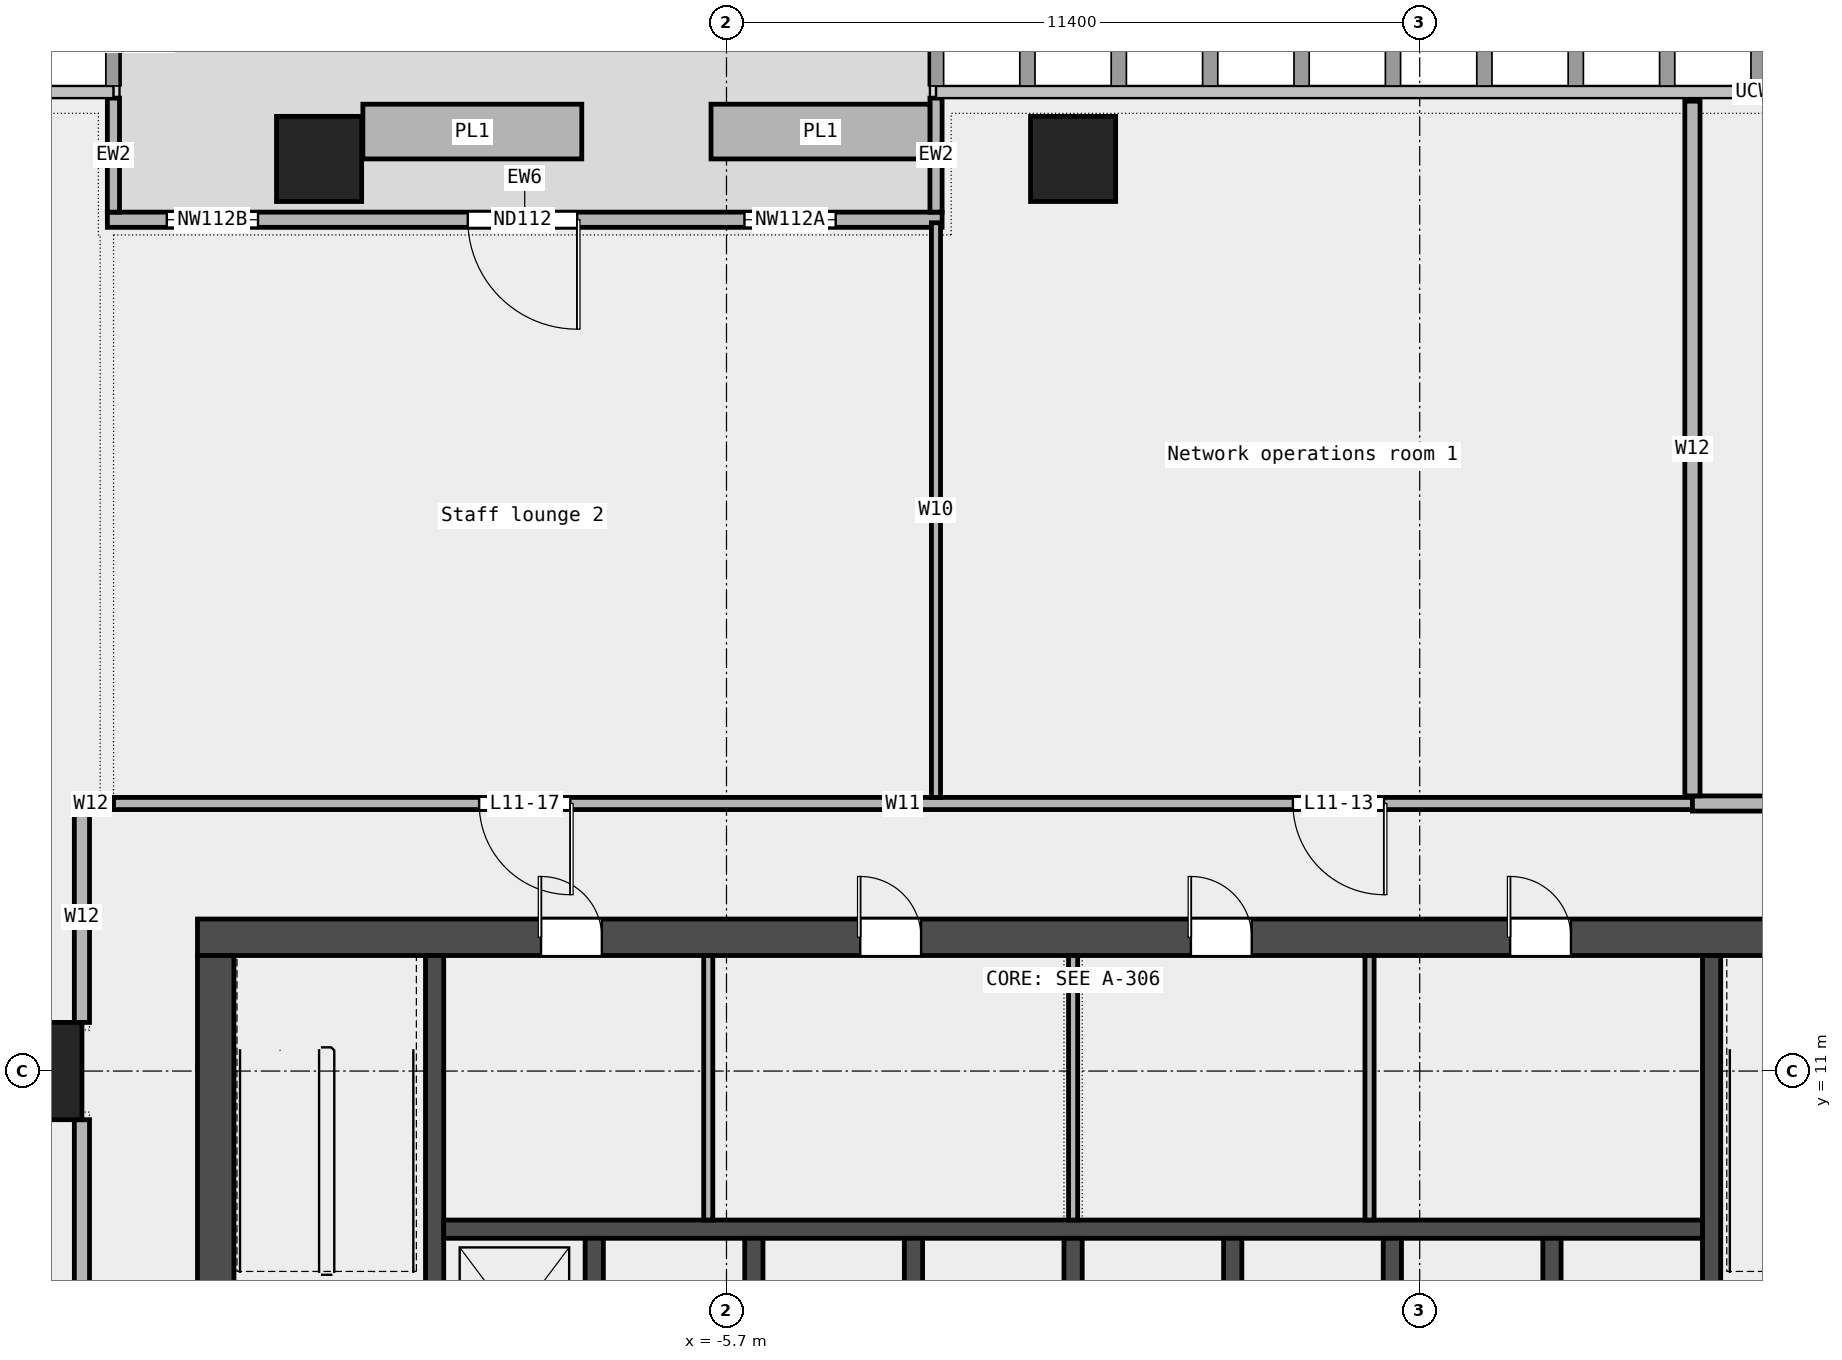
"""IFC4 building model, lengths in metres.
Left out: names, types, materials, properties, quantities, classifications, styles, units other than length and angle.
Written with IfcOpenShell. Run it as: python <this file> out.ifc"""

import sys

from ifc_helpers import new_model, si_unit, direction, frame, frame_2d, origin, origin_2d, place, context, subcontext, project, spatial, rectangle, extrude, element, fill, save


model = new_model("IFC4")
c1 = context("Model", 3, precision=1e-05, world=origin(), true_north=direction((0.0, 1.0)))
c2 = subcontext(c1, "Body", "Model", "MODEL_VIEW")
j1 = project(units=[si_unit("LENGTHUNIT", "METRE"), si_unit("PLANEANGLEUNIT", "RADIAN")], contexts=[c1])
p1 = place(None, origin())
s1 = spatial("IfcSite", under=j1, at=p1, CompositionType="ELEMENT")
p2 = place(p1, origin())
s2 = spatial("IfcBuilding", under=s1, at=p2, CompositionType="ELEMENT")
p3 = place(p2, frame((0.0, 0.0, 59.8)))
s3 = spatial("IfcBuildingStorey", under=s2, at=p3, CompositionType="ELEMENT", Elevation=59.8)
for number, where, z_axis, x_axis in (
    (1, (0.0, 26.0, 0.0), (0.0, 0.0, 1.0), (1.0, 0.0, 0.0)),
    (2, (-12.4, 26.0, 0.0), (0.0, 0.0, 1.0), (1.0, 0.0, 0.0)),
):
    element("IfcColumn", number, at=place(p3, frame(where, z_axis=z_axis, x_axis=x_axis)), inside=s3, PredefinedType="COLUMN", context=c2, shape_type="SweptSolid", body=[
        extrude(rectangle(XDim=1.4, YDim=1.4, at=origin_2d()), origin(), (0.0, 0.0, 1.0), 4.35),
    ])
p4 = place(p3, frame((-17.1, 11.0, 0.0), z_axis=(0.0, 0.0, 1.0), x_axis=(1.0, 0.0, 0.0)))
e3 = element("IfcColumn", 3, at=p4, inside=s3, PredefinedType="COLUMN", context=c2, shape_type="SweptSolid", body=[
    extrude(rectangle(XDim=1.6, YDim=1.6, at=origin_2d()), origin(), (0.0, 0.0, 1.0), 4.35),
])
p5 = place(p3, frame((-2.155, 25.0, 0.0), z_axis=(0.0, 0.0, 1.0), x_axis=(-1.0, 0.0, 0.0)))
e4 = element("IfcWall", 4, at=p5, inside=s3, PredefinedType="STANDARD", context=c2, shape_type="SweptSolid", body=[
    extrude(rectangle(XDim=13.727, YDim=0.25, at=frame_2d((6.864, 0.0))), origin(), (0.0, 0.0, 1.0), 4.35),
])
p6 = place(p5, frame((1.75, 0.0, 0.45)))
e5 = element("IfcOpeningElement", 5, at=p6, cuts=e4, PredefinedType="OPENING", context=c2, shape_type="SweptSolid", body=[
    extrude(rectangle(XDim=1.5, YDim=3.0, at=frame_2d((0.75, 1.5))), frame((0.0, 0.137, 0.0), z_axis=(0.0, -1.0, 0.0), x_axis=(1.0, 0.0, 0.0)), (0.0, 0.0, 1.0), 0.274),
])
p7 = place(p5, frame((6.0, 0.0, 0.0)))
e6 = element("IfcOpeningElement", 6, at=p7, cuts=e4, PredefinedType="OPENING", context=c2, shape_type="SweptSolid", body=[
    extrude(rectangle(XDim=1.8, YDim=2.4, at=frame_2d((0.9, 1.2))), frame((0.0, 0.137, 0.0), z_axis=(0.0, -1.0, 0.0), x_axis=(1.0, 0.0, 0.0)), (0.0, 0.0, 1.0), 0.274),
])
p8 = place(p5, frame((11.25, 0.0, 0.45)))
e7 = element("IfcOpeningElement", 7, at=p8, cuts=e4, PredefinedType="OPENING", context=c2, shape_type="SweptSolid", body=[
    extrude(rectangle(XDim=1.5, YDim=3.0, at=frame_2d((0.75, 1.5))), frame((0.0, 0.137, 0.0), z_axis=(0.0, -1.0, 0.0), x_axis=(1.0, 0.0, 0.0)), (0.0, 0.0, 1.0), 0.274),
])
for number, where, z_axis, x_axis in (
    (8, (-2.255, 27.0, 0.0), (0.0, 0.0, 1.0), (0.0, -1.0, 0.0)),
    (9, (-15.782, 27.0, 0.0), (0.0, 0.0, 1.0), (0.0, -1.0, 0.0)),
):
    element("IfcWall", number, at=place(p3, frame(where, z_axis=z_axis, x_axis=x_axis)), inside=s3, PredefinedType="STANDARD", context=c2, shape_type="SweptSolid", body=[
        extrude(rectangle(XDim=1.875, YDim=0.2, at=frame_2d((0.938, 0.0))), origin(), (0.0, 0.0, 1.0), 4.35),
    ])
for number, where, z_axis, x_axis in (
    (10, (-2.354, 26.45, 0.0), (0.0, 0.0, 1.0), (-1.0, 0.0, 0.0)),
    (11, (-8.08, 26.45, 0.0), (0.0, 0.0, 1.0), (-1.0, 0.0, 0.0)),
):
    element("IfcWall", number, at=place(p3, frame(where, z_axis=z_axis, x_axis=x_axis)), inside=s3, PredefinedType="STANDARD", context=c2, shape_type="SweptSolid", body=[
        extrude(rectangle(XDim=3.6, YDim=0.9, at=frame_2d((1.8, 0.0))), origin(), (0.0, 0.0, 1.0), 0.7),
    ])
p9 = place(p3, frame((-15.78, 15.4, 0.0), z_axis=(0.0, 0.0, 1.0), x_axis=(1.0, 0.0, 0.0)))
e12 = element("IfcWall", 12, at=p9, inside=s3, PredefinedType="PARTITIONING", context=c2, shape_type="SweptSolid", body=[
    extrude(rectangle(XDim=25.965, YDim=0.2, at=frame_2d((12.982, 0.0))), origin(), (0.0, 0.0, 1.0), 4.35),
])
p10 = place(p9, frame((19.395, 0.0, 0.0)))
e13 = element("IfcOpeningElement", 13, at=p10, cuts=e12, PredefinedType="OPENING", context=c2, shape_type="SweptSolid", body=[
    extrude(rectangle(XDim=1.5, YDim=2.1, at=frame_2d((0.75, 1.05))), frame((0.0, 0.112, 0.0), z_axis=(0.0, -1.0, 0.0), x_axis=(1.0, 0.0, 0.0)), (0.0, 0.0, 1.0), 0.224),
])
p11 = place(p9, frame((6.012, 0.0, 0.0)))
e14 = element("IfcOpeningElement", 14, at=p11, cuts=e12, PredefinedType="OPENING", context=c2, shape_type="SweptSolid", body=[
    extrude(rectangle(XDim=1.5, YDim=2.1, at=frame_2d((0.75, 1.05))), frame((0.0, 0.112, 0.0), z_axis=(0.0, -1.0, 0.0), x_axis=(1.0, 0.0, 0.0)), (0.0, 0.0, 1.0), 0.224),
])
p12 = place(p3, frame((-16.3, 15.4, 0.0), z_axis=(0.0, 0.0, 1.0), x_axis=(1.0, 0.0, 0.0)))
e15 = element("IfcWall", 15, at=p12, inside=s3, PredefinedType="PARTITIONING", context=c2, shape_type="SweptSolid", body=[
    extrude(rectangle(XDim=0.3, YDim=0.25, at=frame_2d((0.15, 0.0))), origin(), (0.0, 0.0, 1.0), 4.35),
])
p13 = place(p3, frame((10.185, 15.4, 0.0), z_axis=(0.0, 0.0, 1.0), x_axis=(1.0, 0.0, 0.0)))
e16 = element("IfcWall", 16, at=p13, inside=s3, PredefinedType="PARTITIONING", context=c2, shape_type="SweptSolid", body=[
    extrude(rectangle(XDim=11.515, YDim=0.25, at=frame_2d((5.757, 0.0))), origin(), (0.0, 0.0, 1.0), 4.35),
])
p14 = place(p13, frame((2.157, 0.0, 0.0)))
e17 = element("IfcOpeningElement", 17, at=p14, cuts=e16, PredefinedType="OPENING", context=c2, shape_type="SweptSolid", body=[
    extrude(rectangle(XDim=1.8, YDim=2.1, at=frame_2d((0.9, 1.05))), frame((0.0, 0.137, 0.0), z_axis=(0.0, -1.0, 0.0), x_axis=(1.0, 0.0, 0.0)), (0.0, 0.0, 1.0), 0.274),
])
p15 = place(p3, frame((-16.3, 0.8, 0.0), z_axis=(0.0, 0.0, 1.0), x_axis=(0.0, 1.0, 0.0)))
e18 = element("IfcWall", 18, at=p15, inside=s3, PredefinedType="PARTITIONING", context=c2, shape_type="SweptSolid", body=[
    extrude(rectangle(XDim=9.4, YDim=0.25, at=frame_2d((4.7, 0.0))), origin(), (0.0, 0.0, 1.0), 4.35),
])
p16 = place(p15, frame((3.8, 0.0, 0.0)))
e19 = element("IfcOpeningElement", 19, at=p16, cuts=e18, PredefinedType="OPENING", context=c2, shape_type="SweptSolid", body=[
    extrude(rectangle(XDim=1.8, YDim=2.1, at=frame_2d((0.9, 1.05))), frame((0.0, 0.137, 0.0), z_axis=(0.0, -1.0, 0.0), x_axis=(1.0, 0.0, 0.0)), (0.0, 0.0, 1.0), 0.274),
])
p17 = place(p3, frame((-16.3, 11.8, 0.0), z_axis=(0.0, 0.0, 1.0), x_axis=(0.0, 1.0, 0.0)))
e20 = element("IfcWall", 20, at=p17, inside=s3, PredefinedType="PARTITIONING", context=c2, shape_type="SweptSolid", body=[
    extrude(rectangle(XDim=3.475, YDim=0.25, at=frame_2d((1.737, 0.0))), origin(), (0.0, 0.0, 1.0), 4.35),
])
p18 = place(p3, frame((-2.255, 15.5, 0.0), z_axis=(0.0, 0.0, 1.0), x_axis=(0.0, 1.0, 0.0)))
e21 = element("IfcWall", 21, at=p18, inside=s3, PredefinedType="PARTITIONING", context=c2, shape_type="SweptSolid", body=[
    extrude(rectangle(XDim=9.45, YDim=0.15, at=frame_2d((4.725, 0.0))), origin(), (0.0, 0.0, 1.0), 4.35),
])
p19 = place(p3, frame((10.185, 15.525, 0.0), z_axis=(0.0, 0.0, 1.0), x_axis=(0.0, 1.0, 0.0)))
e22 = element("IfcWall", 22, at=p19, inside=s3, PredefinedType="PARTITIONING", context=c2, shape_type="SweptSolid", body=[
    extrude(rectangle(XDim=11.425, YDim=0.25, at=frame_2d((5.712, 0.0))), origin(), (0.0, 0.0, 1.0), 4.35),
])
p20 = place(p3, frame((-14.4, 13.2, 0.0), z_axis=(0.0, 0.0, 1.0), x_axis=(1.0, 0.0, 0.0)))
e23 = element("IfcWall", 23, at=p20, inside=s3, PredefinedType="SHEAR", context=c2, shape_type="SweptSolid", body=[
    extrude(rectangle(XDim=28.8, YDim=0.6, at=frame_2d((14.4, 0.0))), origin(), (0.0, 0.0, 1.0), 4.5),
])
p21 = place(p20, frame((5.65, 0.0, 0.0)))
e24 = element("IfcOpeningElement", 24, at=p21, cuts=e23, PredefinedType="OPENING", context=c2, shape_type="SweptSolid", body=[
    extrude(rectangle(XDim=1.0, YDim=2.1, at=frame_2d((0.5, 1.05))), frame((0.0, 0.312, 0.0), z_axis=(0.0, -1.0, 0.0), x_axis=(1.0, 0.0, 0.0)), (0.0, 0.0, 1.0), 0.624),
])
p22 = place(p20, frame((10.9, 0.0, 0.0)))
e25 = element("IfcOpeningElement", 25, at=p22, cuts=e23, PredefinedType="OPENING", context=c2, shape_type="SweptSolid", body=[
    extrude(rectangle(XDim=1.0, YDim=2.1, at=frame_2d((0.5, 1.05))), frame((0.0, 0.312, 0.0), z_axis=(0.0, -1.0, 0.0), x_axis=(1.0, 0.0, 0.0)), (0.0, 0.0, 1.0), 0.624),
])
p23 = place(p20, frame((16.337, 0.0, 0.0)))
e26 = element("IfcOpeningElement", 26, at=p23, cuts=e23, PredefinedType="OPENING", context=c2, shape_type="SweptSolid", body=[
    extrude(rectangle(XDim=1.0, YDim=2.1, at=frame_2d((0.5, 1.05))), frame((0.0, 0.312, 0.0), z_axis=(0.0, -1.0, 0.0), x_axis=(1.0, 0.0, 0.0)), (0.0, 0.0, 1.0), 0.624),
])
p24 = place(p20, frame((21.587, 0.0, 0.0)))
e27 = element("IfcOpeningElement", 27, at=p24, cuts=e23, PredefinedType="OPENING", context=c2, shape_type="SweptSolid", body=[
    extrude(rectangle(XDim=1.0, YDim=2.1, at=frame_2d((0.5, 1.05))), frame((0.0, 0.312, 0.0), z_axis=(0.0, -1.0, 0.0), x_axis=(1.0, 0.0, 0.0)), (0.0, 0.0, 1.0), 0.624),
])
p25 = place(p3, frame((-14.1, -6.6, 0.0), z_axis=(0.0, 0.0, 1.0), x_axis=(0.0, 1.0, 0.0)))
e28 = element("IfcWall", 28, at=p25, inside=s3, PredefinedType="SHEAR", context=c2, shape_type="SweptSolid", body=[
    extrude(rectangle(XDim=19.5, YDim=0.6, at=frame_2d((9.75, 0.0))), origin(), (0.0, 0.0, 1.0), 4.5),
])
p26 = place(p25, frame((9.3, 0.0, 0.0)))
e29 = element("IfcOpeningElement", 29, at=p26, cuts=e28, PredefinedType="OPENING", context=c2, shape_type="SweptSolid", body=[
    extrude(rectangle(XDim=1.8, YDim=2.1, at=frame_2d((0.9, 1.05))), frame((0.0, 0.312, 0.0), z_axis=(0.0, -1.0, 0.0), x_axis=(1.0, 0.0, 0.0)), (0.0, 0.0, 1.0), 0.624),
])
for number, where, z_axis, x_axis in (
    (30, (-10.5, 5.25, 0.0), (0.0, 0.0, 1.0), (0.0, 1.0, 0.0)),
    (31, (10.5, 5.25, 0.0), (0.0, 0.0, 1.0), (0.0, 1.0, 0.0)),
):
    element("IfcWall", number, at=place(p3, frame(where, z_axis=z_axis, x_axis=x_axis)), inside=s3, PredefinedType="SHEAR", context=c2, shape_type="SweptSolid", body=[
        extrude(rectangle(XDim=7.65, YDim=0.3, at=frame_2d((3.825, 0.0))), origin(), (0.0, 0.0, 1.0), 4.5),
    ])
p27 = place(p3, frame((-10.35, 8.4, 0.0), z_axis=(0.0, 0.0, 1.0), x_axis=(1.0, 0.0, 0.0)))
e32 = element("IfcWall", 32, at=p27, inside=s3, PredefinedType="SOLIDWALL", context=c2, shape_type="SweptSolid", body=[
    extrude(rectangle(XDim=20.7, YDim=0.3, at=frame_2d((10.35, 0.0))), origin(), (0.0, 0.0, 1.0), 4.5),
])
for number, where, z_axis, x_axis in (
    (33, (-7.875, 5.55, 0.0), (0.0, 0.0, 1.0), (0.0, 1.0, 0.0)),
    (34, (-5.25, 5.55, 0.0), (0.0, 0.0, 1.0), (0.0, 1.0, 0.0)),
    (35, (-2.625, 5.55, 0.0), (0.0, 0.0, 1.0), (0.0, 1.0, 0.0)),
    (36, (0.0, 5.55, 0.0), (0.0, 0.0, 1.0), (0.0, 1.0, 0.0)),
    (37, (2.625, 5.55, 0.0), (0.0, 0.0, 1.0), (0.0, 1.0, 0.0)),
    (38, (5.25, 5.55, 0.0), (0.0, 0.0, 1.0), (0.0, 1.0, 0.0)),
    (39, (7.875, 5.55, 0.0), (0.0, 0.0, 1.0), (0.0, 1.0, 0.0)),
):
    element("IfcWall", number, at=place(p3, frame(where, z_axis=z_axis, x_axis=x_axis)), inside=s3, PredefinedType="SOLIDWALL", context=c2, shape_type="SweptSolid", body=[
        extrude(rectangle(XDim=2.7, YDim=0.3, at=frame_2d((1.35, 0.0))), origin(), (0.0, 0.0, 1.0), 4.5),
    ])
for number, where, z_axis, x_axis in (
    (40, (-6.0, 8.55, 0.0), (0.0, 0.0, 1.0), (0.0, 1.0, 0.0)),
    (41, (0.0, 8.55, 0.0), (0.0, 0.0, 1.0), (0.0, 1.0, 0.0)),
    (42, (4.875, 8.55, 0.0), (0.0, 0.0, 1.0), (0.0, 1.0, 0.0)),
):
    element("IfcWall", number, at=place(p3, frame(where, z_axis=z_axis, x_axis=x_axis)), inside=s3, PredefinedType="PARTITIONING", context=c2, shape_type="SweptSolid", body=[
        extrude(rectangle(XDim=4.35, YDim=0.15, at=frame_2d((2.175, 0.0))), origin(), (0.0, 0.0, 1.0), 4.5),
    ])
p28 = place(p6, origin())
e43 = element("IfcWindow", 43, at=p28, inside=s3, PartitioningType="SINGLE_PANEL", PredefinedType="WINDOW", context=c2, shape_type="SweptSolid", body=[
    extrude(rectangle(XDim=1.5, YDim=3.0, at=frame_2d((0.75, 1.5))), frame((0.0, 0.03, 0.0), z_axis=(0.0, -1.0, 0.0), x_axis=(1.0, 0.0, 0.0)), (0.0, 0.0, 1.0), 0.06),
])
fill(e5, e43)
p29 = place(p7, origin())
e44 = element("IfcDoor", 44, at=p29, inside=s3, OperationType="DOUBLE_DOOR_SINGLE_SWING", PredefinedType="DOOR", context=c2, shape_type="SweptSolid", body=[
    extrude(rectangle(XDim=1.8, YDim=2.4, at=frame_2d((0.9, 1.2))), frame((0.0, 0.025, 0.0), z_axis=(0.0, -1.0, 0.0), x_axis=(1.0, 0.0, 0.0)), (0.0, 0.0, 1.0), 0.05),
])
fill(e6, e44)
p30 = place(p8, origin())
e45 = element("IfcWindow", 45, at=p30, inside=s3, PartitioningType="SINGLE_PANEL", PredefinedType="WINDOW", context=c2, shape_type="SweptSolid", body=[
    extrude(rectangle(XDim=1.5, YDim=3.0, at=frame_2d((0.75, 1.5))), frame((0.0, 0.03, 0.0), z_axis=(0.0, -1.0, 0.0), x_axis=(1.0, 0.0, 0.0)), (0.0, 0.0, 1.0), 0.06),
])
fill(e7, e45)
p31 = place(p10, origin())
e46 = element("IfcDoor", 46, at=p31, inside=s3, OperationType="DOUBLE_DOOR_SINGLE_SWING", PredefinedType="DOOR", context=c2, shape_type="SweptSolid", body=[
    extrude(rectangle(XDim=1.5, YDim=2.1, at=frame_2d((0.75, 1.05))), frame((0.0, 0.025, 0.0), z_axis=(0.0, -1.0, 0.0), x_axis=(1.0, 0.0, 0.0)), (0.0, 0.0, 1.0), 0.05),
])
fill(e13, e46)
p32 = place(p11, origin())
e47 = element("IfcDoor", 47, at=p32, inside=s3, OperationType="DOUBLE_DOOR_SINGLE_SWING", PredefinedType="DOOR", context=c2, shape_type="SweptSolid", body=[
    extrude(rectangle(XDim=1.5, YDim=2.1, at=frame_2d((0.75, 1.05))), frame((0.0, 0.025, 0.0), z_axis=(0.0, -1.0, 0.0), x_axis=(1.0, 0.0, 0.0)), (0.0, 0.0, 1.0), 0.05),
])
fill(e14, e47)
p33 = place(p21, origin())
e48 = element("IfcDoor", 48, at=p33, inside=s3, OperationType="SINGLE_SWING_LEFT", PredefinedType="DOOR", context=c2, shape_type="SweptSolid", body=[
    extrude(rectangle(XDim=1.0, YDim=2.1, at=frame_2d((0.5, 1.05))), frame((0.0, 0.025, 0.0), z_axis=(0.0, -1.0, 0.0), x_axis=(1.0, 0.0, 0.0)), (0.0, 0.0, 1.0), 0.05),
])
fill(e24, e48)
p34 = place(p22, origin())
e49 = element("IfcDoor", 49, at=p34, inside=s3, OperationType="SINGLE_SWING_LEFT", PredefinedType="DOOR", context=c2, shape_type="SweptSolid", body=[
    extrude(rectangle(XDim=1.0, YDim=2.1, at=frame_2d((0.5, 1.05))), frame((0.0, 0.025, 0.0), z_axis=(0.0, -1.0, 0.0), x_axis=(1.0, 0.0, 0.0)), (0.0, 0.0, 1.0), 0.05),
])
fill(e25, e49)
p35 = place(p23, origin())
e50 = element("IfcDoor", 50, at=p35, inside=s3, OperationType="SINGLE_SWING_LEFT", PredefinedType="DOOR", context=c2, shape_type="SweptSolid", body=[
    extrude(rectangle(XDim=1.0, YDim=2.1, at=frame_2d((0.5, 1.05))), frame((0.0, 0.025, 0.0), z_axis=(0.0, -1.0, 0.0), x_axis=(1.0, 0.0, 0.0)), (0.0, 0.0, 1.0), 0.05),
])
fill(e26, e50)
p36 = place(p24, origin())
e51 = element("IfcDoor", 51, at=p36, inside=s3, OperationType="SINGLE_SWING_LEFT", PredefinedType="DOOR", context=c2, shape_type="SweptSolid", body=[
    extrude(rectangle(XDim=1.0, YDim=2.1, at=frame_2d((0.5, 1.05))), frame((0.0, 0.025, 0.0), z_axis=(0.0, -1.0, 0.0), x_axis=(1.0, 0.0, 0.0)), (0.0, 0.0, 1.0), 0.05),
])
fill(e27, e51)
save(model, sys.argv[1])
